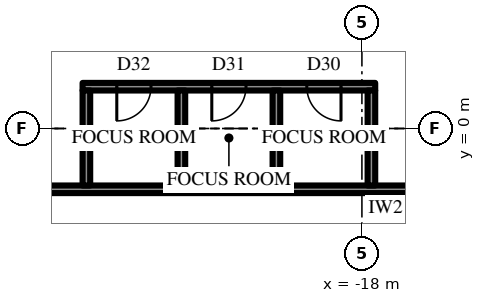
"""IFC4 building model, lengths in metres.
Left out: names, types, materials, properties, quantities, classifications, styles, units other than length and angle.
Written with IfcOpenShell. Run it as: python <this file> out.ifc"""

import sys

from ifc_helpers import new_model, si_unit, direction, frame, frame_2d, origin, place, context, subcontext, project, spatial, rectangle, extrude, element, fill, save


model = new_model("IFC4")
c1 = context("Model", 3, precision=1e-05, world=origin(), true_north=direction((0.0, 1.0)))
c2 = subcontext(c1, "Body", "Model", "MODEL_VIEW")
j1 = project(units=[si_unit("LENGTHUNIT", "METRE"), si_unit("PLANEANGLEUNIT", "RADIAN")], contexts=[c1])
p1 = place(None, origin())
s1 = spatial("IfcSite", under=j1, at=p1, CompositionType="ELEMENT")
p2 = place(p1, origin())
s2 = spatial("IfcBuilding", under=s1, at=p2, CompositionType="ELEMENT")
p3 = place(p2, frame((0.0, 0.0, 357.7)))
s3 = spatial("IfcBuildingStorey", under=s2, at=p3, CompositionType="ELEMENT", Elevation=357.7)
p4 = place(p3, frame((-29.459, -2.175, 0.0), z_axis=(0.0, 0.0, 1.0), x_axis=(0.499996453679, -0.866027451244, 0.0)))
e1 = element("IfcWall", 1, at=p4, inside=s3, PredefinedType="SOLIDWALL", context=c2, shape_type="SweptSolid", body=[
    extrude(rectangle(XDim=9.564, YDim=0.3, at=frame_2d((4.782, 0.0))), origin(), (0.0, 0.0, 1.0), 2.9),
])
p5 = place(p4, frame((0.866, 0.0, 0.6)))
e2 = element("IfcOpeningElement", 2, at=p5, cuts=e1, PredefinedType="OPENING", context=c2, shape_type="SweptSolid", body=[
    extrude(rectangle(XDim=2.55, YDim=2.05, at=frame_2d((1.275, 1.025))), frame((0.0, 0.16, 0.0), z_axis=(0.0, -1.0, 0.0), x_axis=(1.0, 0.0, 0.0)), (0.0, 0.0, 1.0), 0.32),
])
p6 = place(p4, frame((5.823, 0.0, 0.0)))
e3 = element("IfcOpeningElement", 3, at=p6, cuts=e1, PredefinedType="OPENING", context=c2, shape_type="SweptSolid", body=[
    extrude(rectangle(XDim=1.2, YDim=2.4, at=frame_2d((0.6, 1.2))), frame((0.0, 0.16, 0.0), z_axis=(0.0, -1.0, 0.0), x_axis=(1.0, 0.0, 0.0)), (0.0, 0.0, 1.0), 0.32),
])
p7 = place(p3, frame((-12.425, -1.6, 0.0), z_axis=(0.0, 0.0, 1.0), x_axis=(-1.0, 0.0, 0.0)))
e4 = element("IfcWall", 4, at=p7, inside=s3, PredefinedType="PARTITIONING", context=c2, shape_type="SweptSolid", body=[
    extrude(rectangle(XDim=16.5, YDim=0.2, at=frame_2d((8.25, 0.0))), origin(), (0.0, 0.0, 1.0), 4.0),
])
p8 = place(p7, frame((1.15, 0.0, 0.0)))
e5 = element("IfcOpeningElement", 5, at=p8, cuts=e4, PredefinedType="OPENING", context=c2, shape_type="SweptSolid", body=[
    extrude(rectangle(XDim=1.0, YDim=2.2, at=frame_2d((0.5, 1.1))), frame((0.0, 0.11, 0.0), z_axis=(0.0, -1.0, 0.0), x_axis=(1.0, 0.0, 0.0)), (0.0, 0.0, 1.0), 0.22),
])
p9 = place(p3, frame((-17.65, 1.1, 0.0), z_axis=(0.0, 0.0, 1.0), x_axis=(-1.0, 0.0, 0.0)))
e6 = element("IfcWall", 6, at=p9, inside=s3, PredefinedType="PARTITIONING", context=c2, shape_type="SweptSolid", body=[
    extrude(rectangle(XDim=7.7, YDim=0.2, at=frame_2d((3.85, 0.0))), origin(), (0.0, 0.0, 1.0), 4.0),
])
p10 = place(p9, frame((0.9, 0.0, 0.0)))
e7 = element("IfcOpeningElement", 7, at=p10, cuts=e6, PredefinedType="OPENING", context=c2, shape_type="SweptSolid", body=[
    extrude(rectangle(XDim=0.9, YDim=2.2, at=frame_2d((0.45, 1.1))), frame((0.0, 0.11, 0.0), z_axis=(0.0, -1.0, 0.0), x_axis=(1.0, 0.0, 0.0)), (0.0, 0.0, 1.0), 0.22),
])
p11 = place(p9, frame((3.4, 0.0, 0.0)))
e8 = element("IfcOpeningElement", 8, at=p11, cuts=e6, PredefinedType="OPENING", context=c2, shape_type="SweptSolid", body=[
    extrude(rectangle(XDim=0.9, YDim=2.2, at=frame_2d((0.45, 1.1))), frame((0.0, 0.11, 0.0), z_axis=(0.0, -1.0, 0.0), x_axis=(1.0, 0.0, 0.0)), (0.0, 0.0, 1.0), 0.22),
])
p12 = place(p9, frame((5.9, 0.0, 0.0)))
e9 = element("IfcOpeningElement", 9, at=p12, cuts=e6, PredefinedType="OPENING", context=c2, shape_type="SweptSolid", body=[
    extrude(rectangle(XDim=0.9, YDim=2.2, at=frame_2d((0.45, 1.1))), frame((0.0, 0.11, 0.0), z_axis=(0.0, -1.0, 0.0), x_axis=(1.0, 0.0, 0.0)), (0.0, 0.0, 1.0), 0.22),
])
for number, where, z_axis, x_axis in (
    (10, (-17.75, -1.5, 0.0), (0.0, 0.0, 1.0), (0.0, 1.0, 0.0)),
    (11, (-20.25, -1.5, 0.0), (0.0, 0.0, 1.0), (0.0, 1.0, 0.0)),
    (12, (-22.75, -1.5, 0.0), (0.0, 0.0, 1.0), (0.0, 1.0, 0.0)),
    (13, (-25.25, -1.5, 0.0), (0.0, 0.0, 1.0), (0.0, 1.0, 0.0)),
):
    element("IfcWall", number, at=place(p3, frame(where, z_axis=z_axis, x_axis=x_axis)), inside=s3, PredefinedType="PARTITIONING", context=c2, shape_type="SweptSolid", body=[
        extrude(rectangle(XDim=2.5, YDim=0.2, at=frame_2d((1.25, 0.0))), origin(), (0.0, 0.0, 1.0), 4.0),
    ])
p13 = place(p10, origin())
e14 = element("IfcDoor", 14, at=p13, inside=s3, OperationType="SINGLE_SWING_RIGHT", PredefinedType="DOOR", context=c2, shape_type="SweptSolid", body=[
    extrude(rectangle(XDim=0.9, YDim=2.2, at=frame_2d((0.45, 1.1))), frame((0.0, 0.025, 0.0), z_axis=(0.0, -1.0, 0.0), x_axis=(1.0, 0.0, 0.0)), (0.0, 0.0, 1.0), 0.05),
])
fill(e7, e14)
p14 = place(p11, origin())
e15 = element("IfcDoor", 15, at=p14, inside=s3, OperationType="SINGLE_SWING_LEFT", PredefinedType="DOOR", context=c2, shape_type="SweptSolid", body=[
    extrude(rectangle(XDim=0.9, YDim=2.2, at=frame_2d((0.45, 1.1))), frame((0.0, 0.025, 0.0), z_axis=(0.0, -1.0, 0.0), x_axis=(1.0, 0.0, 0.0)), (0.0, 0.0, 1.0), 0.05),
])
fill(e8, e15)
p15 = place(p12, origin())
e16 = element("IfcDoor", 16, at=p15, inside=s3, OperationType="SINGLE_SWING_LEFT", PredefinedType="DOOR", context=c2, shape_type="SweptSolid", body=[
    extrude(rectangle(XDim=0.9, YDim=2.2, at=frame_2d((0.45, 1.1))), frame((0.0, 0.025, 0.0), z_axis=(0.0, -1.0, 0.0), x_axis=(1.0, 0.0, 0.0)), (0.0, 0.0, 1.0), 0.05),
])
fill(e9, e16)
save(model, sys.argv[1])
